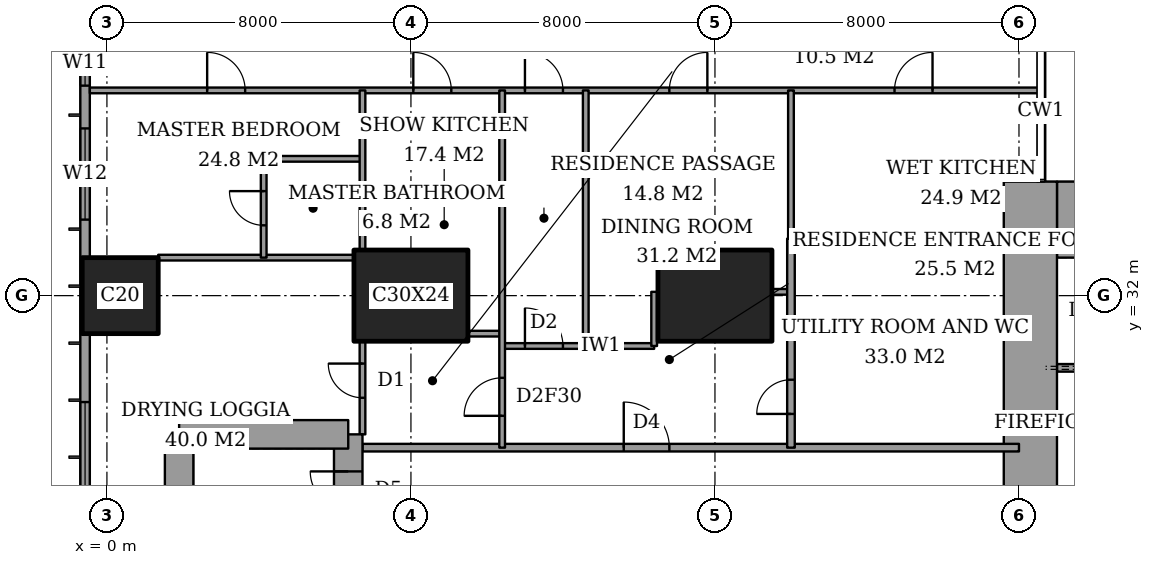
"""IFC4 building model, lengths in metres.
Left out: names, types, materials, properties, quantities, classifications, styles, units other than length and angle.
Written with IfcOpenShell. Run it as: python <this file> out.ifc"""

import sys

from ifc_helpers import new_model, si_unit, direction, frame, frame_2d, origin, origin_2d, place, context, subcontext, project, spatial, rectangle, extrude, element, fill, save


model = new_model("IFC4")
c1 = context("Model", 3, precision=1e-05, world=origin(), true_north=direction((0.0, 1.0)))
c2 = subcontext(c1, "Body", "Model", "MODEL_VIEW")
j1 = project(units=[si_unit("LENGTHUNIT", "METRE"), si_unit("PLANEANGLEUNIT", "RADIAN")], contexts=[c1])
p1 = place(None, origin())
s1 = spatial("IfcSite", under=j1, at=p1, CompositionType="ELEMENT")
p2 = place(p1, origin())
s2 = spatial("IfcBuilding", under=s1, at=p2, CompositionType="ELEMENT")
p3 = place(p2, frame((0.0, 0.0, 168.2)))
s3 = spatial("IfcBuildingStorey", under=s2, at=p3, CompositionType="ELEMENT", Elevation=168.2)
p4 = place(p3, frame((0.35, 32.0, 0.0), z_axis=(0.0, 0.0, 1.0), x_axis=(1.0, 0.0, 0.0)))
e1 = element("IfcColumn", 1, at=p4, inside=s3, PredefinedType="COLUMN", context=c2, shape_type="SweptSolid", body=[
    extrude(rectangle(XDim=2.0, YDim=2.0, at=origin_2d()), origin(), (0.0, 0.0, 1.0), 3.6),
])
for number, where, z_axis, x_axis in (
    (2, (8.0, 32.0, 0.0), (0.0, 0.0, 1.0), (1.0, 0.0, 0.0)),
    (3, (16.0, 32.0, 0.0), (0.0, 0.0, 1.0), (1.0, 0.0, 0.0)),
):
    element("IfcColumn", number, at=place(p3, frame(where, z_axis=z_axis, x_axis=x_axis)), inside=s3, PredefinedType="COLUMN", context=c2, shape_type="SweptSolid", body=[
        extrude(rectangle(XDim=3.0, YDim=2.4, at=origin_2d()), origin(), (0.0, 0.0, 1.0), 3.6),
    ])
p5 = place(p3, frame((25.0, 34.0, 0.0), z_axis=(0.0, 0.0, 1.0), x_axis=(1.0, 0.0, 0.0)))
e4 = element("IfcWall", 4, at=p5, inside=s3, PredefinedType="SHEAR", context=c2, shape_type="SweptSolid", body=[
    extrude(rectangle(XDim=3.15, YDim=2.0, at=frame_2d((1.575, 0.0))), origin(), (0.0, 0.0, 1.0), 3.6),
])
p6 = place(p3, frame((24.3, 23.15, 0.0), z_axis=(0.0, 0.0, 1.0), x_axis=(0.0, 1.0, 0.0)))
e5 = element("IfcWall", 5, at=p6, inside=s3, PredefinedType="SHEAR", context=c2, shape_type="SweptSolid", body=[
    extrude(rectangle(XDim=11.85, YDim=1.4, at=frame_2d((5.925, 0.0))), origin(), (0.0, 0.0, 1.0), 3.6),
])
p7 = place(p6, frame((0.75, 0.0, 0.0)))
e6 = element("IfcOpeningElement", 6, at=p7, cuts=e5, PredefinedType="OPENING", context=c2, shape_type="SweptSolid", body=[
    extrude(rectangle(XDim=1.8, YDim=2.4, at=frame_2d((0.9, 1.2))), frame((0.0, 0.71, 0.0), z_axis=(0.0, -1.0, 0.0), x_axis=(1.0, 0.0, 0.0)), (0.0, 0.0, 1.0), 1.42),
])
p8 = place(p3, frame((6.35, 19.65, 0.0), z_axis=(0.0, 0.0, 1.0), x_axis=(0.0, 1.0, 0.0)))
e7 = element("IfcWall", 7, at=p8, inside=s3, PredefinedType="SHEAR", context=c2, shape_type="SweptSolid", body=[
    extrude(rectangle(XDim=8.7, YDim=0.75, at=frame_2d((4.35, 0.0))), origin(), (0.0, 0.0, 1.0), 3.6),
])
p9 = place(p8, frame((6.725, 0.0, 0.0)))
e8 = element("IfcOpeningElement", 8, at=p9, cuts=e7, PredefinedType="OPENING", context=c2, shape_type="SweptSolid", body=[
    extrude(rectangle(XDim=1.0, YDim=2.1, at=frame_2d((0.5, 1.05))), frame((0.0, 0.385, 0.0), z_axis=(0.0, -1.0, 0.0), x_axis=(1.0, 0.0, 0.0)), (0.0, 0.0, 1.0), 0.77),
])
p10 = place(p3, frame((6.35, 28.35, 0.0), z_axis=(0.0, 0.0, 1.0), x_axis=(-1.0, 0.0, 0.0)))
e9 = element("IfcWall", 9, at=p10, inside=s3, PredefinedType="SHEAR", context=c2, shape_type="SweptSolid", body=[
    extrude(rectangle(XDim=4.45, YDim=0.75, at=frame_2d((2.225, 0.0))), origin(), (0.0, 0.0, 1.0), 3.6),
])
p11 = place(p3, frame((1.9, 28.35, 0.0), z_axis=(0.0, 0.0, 1.0), x_axis=(0.0, -1.0, 0.0)))
e10 = element("IfcWall", 10, at=p11, inside=s3, PredefinedType="SHEAR", context=c2, shape_type="SweptSolid", body=[
    extrude(rectangle(XDim=8.7, YDim=0.75, at=frame_2d((4.35, 0.0))), origin(), (0.0, 0.0, 1.0), 3.6),
])
p12 = place(p3, frame((-0.575, 44.825, 0.0), z_axis=(0.0, 0.0, 1.0), x_axis=(0.0, -1.0, 0.0)))
e11 = element("IfcWall", 11, at=p12, inside=s3, PredefinedType="SOLIDWALL", context=c2, shape_type="SweptSolid", body=[
    extrude(rectangle(XDim=41.65, YDim=0.25, at=frame_2d((20.825, 0.0))), origin(), (0.0, 0.0, 1.0), 3.6),
])
p13 = place(p12, frame((0.775, 0.0, 0.4)))
e12 = element("IfcOpeningElement", 12, at=p13, cuts=e11, PredefinedType="OPENING", context=c2, shape_type="SweptSolid", body=[
    extrude(rectangle(XDim=2.4, YDim=2.2, at=frame_2d((1.2, 1.1))), frame((0.0, 0.135, 0.0), z_axis=(0.0, -1.0, 0.0), x_axis=(1.0, 0.0, 0.0)), (0.0, 0.0, 1.0), 0.27),
])
p14 = place(p12, frame((6.1, 0.0, 0.4)))
e13 = element("IfcOpeningElement", 13, at=p14, cuts=e11, PredefinedType="OPENING", context=c2, shape_type="SweptSolid", body=[
    extrude(rectangle(XDim=1.2, YDim=2.2, at=frame_2d((0.6, 1.1))), frame((0.0, 0.135, 0.0), z_axis=(0.0, -1.0, 0.0), x_axis=(1.0, 0.0, 0.0)), (0.0, 0.0, 1.0), 0.27),
])
p15 = place(p12, frame((8.425, 0.0, 0.4)))
e14 = element("IfcOpeningElement", 14, at=p15, cuts=e11, PredefinedType="OPENING", context=c2, shape_type="SweptSolid", body=[
    extrude(rectangle(XDim=2.4, YDim=2.2, at=frame_2d((1.2, 1.1))), frame((0.0, 0.135, 0.0), z_axis=(0.0, -1.0, 0.0), x_axis=(1.0, 0.0, 0.0)), (0.0, 0.0, 1.0), 0.27),
])
p16 = place(p12, frame((15.625, 0.0, 0.4)))
e15 = element("IfcOpeningElement", 15, at=p16, cuts=e11, PredefinedType="OPENING", context=c2, shape_type="SweptSolid", body=[
    extrude(rectangle(XDim=2.4, YDim=2.2, at=frame_2d((1.2, 1.1))), frame((0.0, 0.135, 0.0), z_axis=(0.0, -1.0, 0.0), x_axis=(1.0, 0.0, 0.0)), (0.0, 0.0, 1.0), 0.27),
])
p17 = place(p12, frame((23.625, 0.0, 0.4)))
e16 = element("IfcOpeningElement", 16, at=p17, cuts=e11, PredefinedType="OPENING", context=c2, shape_type="SweptSolid", body=[
    extrude(rectangle(XDim=2.4, YDim=2.2, at=frame_2d((1.2, 1.1))), frame((0.0, 0.135, 0.0), z_axis=(0.0, -1.0, 0.0), x_axis=(1.0, 0.0, 0.0)), (0.0, 0.0, 1.0), 0.27),
])
p18 = place(p12, frame((30.825, 0.0, 0.4)))
e17 = element("IfcOpeningElement", 17, at=p18, cuts=e11, PredefinedType="OPENING", context=c2, shape_type="SweptSolid", body=[
    extrude(rectangle(XDim=2.4, YDim=2.2, at=frame_2d((1.2, 1.1))), frame((0.0, 0.135, 0.0), z_axis=(0.0, -1.0, 0.0), x_axis=(1.0, 0.0, 0.0)), (0.0, 0.0, 1.0), 0.27),
])
p19 = place(p12, frame((34.5, 0.0, 0.4)))
e18 = element("IfcOpeningElement", 18, at=p19, cuts=e11, PredefinedType="OPENING", context=c2, shape_type="SweptSolid", body=[
    extrude(rectangle(XDim=1.2, YDim=2.2, at=frame_2d((0.6, 1.1))), frame((0.0, 0.135, 0.0), z_axis=(0.0, -1.0, 0.0), x_axis=(1.0, 0.0, 0.0)), (0.0, 0.0, 1.0), 0.27),
])
p20 = place(p12, frame((38.475, 0.0, 0.4)))
e19 = element("IfcOpeningElement", 19, at=p20, cuts=e11, PredefinedType="OPENING", context=c2, shape_type="SweptSolid", body=[
    extrude(rectangle(XDim=2.4, YDim=2.2, at=frame_2d((1.2, 1.1))), frame((0.0, 0.135, 0.0), z_axis=(0.0, -1.0, 0.0), x_axis=(1.0, 0.0, 0.0)), (0.0, 0.0, 1.0), 0.27),
])
p21 = place(p3, frame((6.725, 28.0, 0.0), z_axis=(0.0, 0.0, 1.0), x_axis=(1.0, 0.0, 0.0)))
e20 = element("IfcWall", 20, at=p21, inside=s3, PredefinedType="PARTITIONING", context=c2, shape_type="SweptSolid", body=[
    extrude(rectangle(XDim=17.275, YDim=0.2, at=frame_2d((8.637, 0.0))), origin(), (0.0, 0.0, 1.0), 3.25),
])
p22 = place(p21, frame((6.875, 0.0, 0.0)))
e21 = element("IfcOpeningElement", 21, at=p22, cuts=e20, PredefinedType="OPENING", context=c2, shape_type="SweptSolid", body=[
    extrude(rectangle(XDim=1.2, YDim=2.4, at=frame_2d((0.6, 1.2))), frame((0.0, 0.11, 0.0), z_axis=(0.0, -1.0, 0.0), x_axis=(1.0, 0.0, 0.0)), (0.0, 0.0, 1.0), 0.22),
])
p23 = place(p3, frame((10.4, 30.675, 0.0), z_axis=(0.0, 0.0, 1.0), x_axis=(1.0, 0.0, 0.0)))
e22 = element("IfcWall", 22, at=p23, inside=s3, PredefinedType="PARTITIONING", context=c2, shape_type="SweptSolid", body=[
    extrude(rectangle(XDim=4.0, YDim=0.15, at=frame_2d((2.0, 0.0))), origin(), (0.0, 0.0, 1.0), 3.25),
])
p24 = place(p23, frame((0.6, 0.0, 0.0)))
e23 = element("IfcOpeningElement", 23, at=p24, cuts=e22, PredefinedType="OPENING", context=c2, shape_type="SweptSolid", body=[
    extrude(rectangle(XDim=1.0, YDim=2.1, at=frame_2d((0.5, 1.05))), frame((0.0, 0.085, 0.0), z_axis=(0.0, -1.0, 0.0), x_axis=(1.0, 0.0, 0.0)), (0.0, 0.0, 1.0), 0.17),
])
p25 = place(p3, frame((9.5, 31.0, 0.0), z_axis=(0.0, 0.0, 1.0), x_axis=(1.0, 0.0, 0.0)))
e24 = element("IfcWall", 24, at=p25, inside=s3, PredefinedType="PARTITIONING", context=c2, shape_type="SweptSolid", body=[
    extrude(rectangle(XDim=0.9, YDim=0.15, at=frame_2d((0.45, 0.0))), origin(), (0.0, 0.0, 1.0), 3.25),
])
p26 = place(p3, frame((17.5, 32.1, 0.0), z_axis=(0.0, 0.0, 1.0), x_axis=(1.0, 0.0, 0.0)))
e25 = element("IfcWall", 25, at=p26, inside=s3, PredefinedType="PARTITIONING", context=c2, shape_type="SweptSolid", body=[
    extrude(rectangle(XDim=0.5, YDim=0.15, at=frame_2d((0.25, 0.0))), origin(), (0.0, 0.0, 1.0), 3.25),
])
p27 = place(p3, frame((1.35, 33.0, 0.0), z_axis=(0.0, 0.0, 1.0), x_axis=(1.0, 0.0, 0.0)))
e26 = element("IfcWall", 26, at=p27, inside=s3, PredefinedType="PARTITIONING", context=c2, shape_type="SweptSolid", body=[
    extrude(rectangle(XDim=5.15, YDim=0.15, at=frame_2d((2.575, 0.0))), origin(), (0.0, 0.0, 1.0), 3.25),
])
p28 = place(p3, frame((18.0, 33.5, 0.0), z_axis=(0.0, 0.0, 1.0), x_axis=(1.0, 0.0, 0.0)))
e27 = element("IfcWall", 27, at=p28, inside=s3, PredefinedType="PARTITIONING", context=c2, shape_type="SweptSolid", body=[
    extrude(rectangle(XDim=6.0, YDim=0.2, at=frame_2d((3.0, 0.0))), origin(), (0.0, 0.0, 1.0), 3.25),
])
p29 = place(p3, frame((4.125, 35.6, 0.0), z_axis=(0.0, 0.0, 1.0), x_axis=(1.0, 0.0, 0.0)))
e28 = element("IfcWall", 28, at=p29, inside=s3, PredefinedType="PARTITIONING", context=c2, shape_type="SweptSolid", body=[
    extrude(rectangle(XDim=2.6, YDim=0.15, at=frame_2d((1.3, 0.0))), origin(), (0.0, 0.0, 1.0), 3.25),
])
p30 = place(p3, frame((-0.45, 37.4, 0.0), z_axis=(0.0, 0.0, 1.0), x_axis=(1.0, 0.0, 0.0)))
e29 = element("IfcWall", 29, at=p30, inside=s3, PredefinedType="PARTITIONING", context=c2, shape_type="SweptSolid", body=[
    extrude(rectangle(XDim=25.011, YDim=0.15, at=frame_2d((12.505, 0.0))), origin(), (0.0, 0.0, 1.0), 3.25),
])
p31 = place(p30, frame((11.45, 0.0, 0.0)))
e30 = element("IfcOpeningElement", 30, at=p31, cuts=e29, PredefinedType="OPENING", context=c2, shape_type="SweptSolid", body=[
    extrude(rectangle(XDim=1.0, YDim=2.1, at=frame_2d((0.5, 1.05))), frame((0.0, 0.085, 0.0), z_axis=(0.0, -1.0, 0.0), x_axis=(1.0, 0.0, 0.0)), (0.0, 0.0, 1.0), 0.17),
])
p32 = place(p30, frame((3.087, 0.0, 0.0)))
e31 = element("IfcOpeningElement", 31, at=p32, cuts=e29, PredefinedType="OPENING", context=c2, shape_type="SweptSolid", body=[
    extrude(rectangle(XDim=1.0, YDim=2.1, at=frame_2d((0.5, 1.05))), frame((0.0, 0.085, 0.0), z_axis=(0.0, -1.0, 0.0), x_axis=(1.0, 0.0, 0.0)), (0.0, 0.0, 1.0), 0.17),
])
p33 = place(p30, frame((8.512, 0.0, 0.0)))
e32 = element("IfcOpeningElement", 32, at=p33, cuts=e29, PredefinedType="OPENING", context=c2, shape_type="SweptSolid", body=[
    extrude(rectangle(XDim=1.0, YDim=2.1, at=frame_2d((0.5, 1.05))), frame((0.0, 0.085, 0.0), z_axis=(0.0, -1.0, 0.0), x_axis=(1.0, 0.0, 0.0)), (0.0, 0.0, 1.0), 0.17),
])
p34 = place(p30, frame((15.25, 0.0, 0.0)))
e33 = element("IfcOpeningElement", 33, at=p34, cuts=e29, PredefinedType="OPENING", context=c2, shape_type="SweptSolid", body=[
    extrude(rectangle(XDim=1.0, YDim=2.1, at=frame_2d((0.5, 1.05))), frame((0.0, 0.085, 0.0), z_axis=(0.0, -1.0, 0.0), x_axis=(1.0, 0.0, 0.0)), (0.0, 0.0, 1.0), 0.17),
])
p35 = place(p30, frame((21.175, 0.0, 0.0)))
e34 = element("IfcOpeningElement", 34, at=p35, cuts=e29, PredefinedType="OPENING", context=c2, shape_type="SweptSolid", body=[
    extrude(rectangle(XDim=1.0, YDim=2.1, at=frame_2d((0.5, 1.05))), frame((0.0, 0.085, 0.0), z_axis=(0.0, -1.0, 0.0), x_axis=(1.0, 0.0, 0.0)), (0.0, 0.0, 1.0), 0.17),
])
p36 = place(p3, frame((4.125, 33.0, 0.0), z_axis=(0.0, 0.0, 1.0), x_axis=(0.0, 1.0, 0.0)))
e35 = element("IfcWall", 35, at=p36, inside=s3, PredefinedType="PARTITIONING", context=c2, shape_type="SweptSolid", body=[
    extrude(rectangle(XDim=2.6, YDim=0.15, at=frame_2d((1.3, 0.0))), origin(), (0.0, 0.0, 1.0), 3.25),
])
p37 = place(p36, frame((0.85, 0.0, 0.0)))
e36 = element("IfcOpeningElement", 36, at=p37, cuts=e35, PredefinedType="OPENING", context=c2, shape_type="SweptSolid", body=[
    extrude(rectangle(XDim=0.9, YDim=2.1, at=frame_2d((0.45, 1.05))), frame((0.0, 0.085, 0.0), z_axis=(0.0, -1.0, 0.0), x_axis=(1.0, 0.0, 0.0)), (0.0, 0.0, 1.0), 0.17),
])
p38 = place(p3, frame((6.725, 28.35, 0.0), z_axis=(0.0, 0.0, 1.0), x_axis=(0.0, 1.0, 0.0)))
e37 = element("IfcWall", 37, at=p38, inside=s3, PredefinedType="PARTITIONING", context=c2, shape_type="SweptSolid", body=[
    extrude(rectangle(XDim=2.45, YDim=0.15, at=frame_2d((1.225, 0.0))), origin(), (0.0, 0.0, 1.0), 3.25),
])
p39 = place(p38, frame((0.962, 0.0, 0.0)))
e38 = element("IfcOpeningElement", 38, at=p39, cuts=e37, PredefinedType="OPENING", context=c2, shape_type="SweptSolid", body=[
    extrude(rectangle(XDim=0.9, YDim=2.1, at=frame_2d((0.45, 1.05))), frame((0.0, 0.085, 0.0), z_axis=(0.0, -1.0, 0.0), x_axis=(1.0, 0.0, 0.0)), (0.0, 0.0, 1.0), 0.17),
])
p40 = place(p3, frame((6.725, 33.2, 0.0), z_axis=(0.0, 0.0, 1.0), x_axis=(0.0, 1.0, 0.0)))
e39 = element("IfcWall", 39, at=p40, inside=s3, PredefinedType="PARTITIONING", context=c2, shape_type="SweptSolid", body=[
    extrude(rectangle(XDim=4.2, YDim=0.15, at=frame_2d((2.1, 0.0))), origin(), (0.0, 0.0, 1.0), 3.25),
])
p41 = place(p3, frame((10.4, 28.0, 0.0), z_axis=(0.0, 0.0, 1.0), x_axis=(0.0, 1.0, 0.0)))
e40 = element("IfcWall", 40, at=p41, inside=s3, PredefinedType="PARTITIONING", context=c2, shape_type="SweptSolid", body=[
    extrude(rectangle(XDim=9.4, YDim=0.15, at=frame_2d((4.7, 0.0))), origin(), (0.0, 0.0, 1.0), 3.25),
])
p42 = place(p41, frame((0.837, 0.0, 0.0)))
e41 = element("IfcOpeningElement", 41, at=p42, cuts=e40, PredefinedType="OPENING", context=c2, shape_type="SweptSolid", body=[
    extrude(rectangle(XDim=1.0, YDim=2.1, at=frame_2d((0.5, 1.05))), frame((0.0, 0.085, 0.0), z_axis=(0.0, -1.0, 0.0), x_axis=(1.0, 0.0, 0.0)), (0.0, 0.0, 1.0), 0.17),
])
p43 = place(p3, frame((12.6, 30.675, 0.0), z_axis=(0.0, 0.0, 1.0), x_axis=(0.0, 1.0, 0.0)))
e42 = element("IfcWall", 42, at=p43, inside=s3, PredefinedType="PARTITIONING", context=c2, shape_type="SweptSolid", body=[
    extrude(rectangle(XDim=6.725, YDim=0.15, at=frame_2d((3.362, 0.0))), origin(), (0.0, 0.0, 1.0), 3.25),
])
p44 = place(p3, frame((14.4, 30.675, 0.0), z_axis=(0.0, 0.0, 1.0), x_axis=(0.0, 1.0, 0.0)))
e43 = element("IfcWall", 43, at=p44, inside=s3, PredefinedType="PARTITIONING", context=c2, shape_type="SweptSolid", body=[
    extrude(rectangle(XDim=1.425, YDim=0.15, at=frame_2d((0.712, 0.0))), origin(), (0.0, 0.0, 1.0), 3.25),
])
p45 = place(p3, frame((18.0, 28.0, 0.0), z_axis=(0.0, 0.0, 1.0), x_axis=(0.0, 1.0, 0.0)))
e44 = element("IfcWall", 44, at=p45, inside=s3, PredefinedType="PARTITIONING", context=c2, shape_type="SweptSolid", body=[
    extrude(rectangle(XDim=5.5, YDim=0.2, at=frame_2d((2.75, 0.0))), origin(), (0.0, 0.0, 1.0), 3.25),
])
p46 = place(p45, frame((0.887, 0.0, 0.0)))
e45 = element("IfcOpeningElement", 45, at=p46, cuts=e44, PredefinedType="OPENING", context=c2, shape_type="SweptSolid", body=[
    extrude(rectangle(XDim=0.9, YDim=2.1, at=frame_2d((0.45, 1.05))), frame((0.0, 0.11, 0.0), z_axis=(0.0, -1.0, 0.0), x_axis=(1.0, 0.0, 0.0)), (0.0, 0.0, 1.0), 0.22),
])
p47 = place(p3, frame((18.0, 33.5, 0.0), z_axis=(0.0, 0.0, 1.0), x_axis=(0.0, 1.0, 0.0)))
e46 = element("IfcWall", 46, at=p47, inside=s3, PredefinedType="PARTITIONING", context=c2, shape_type="SweptSolid", body=[
    extrude(rectangle(XDim=3.9, YDim=0.15, at=frame_2d((1.95, 0.0))), origin(), (0.0, 0.0, 1.0), 3.25),
])
p48 = place(p3, frame((25.0, 30.1, 0.0), z_axis=(0.0, 0.0, 1.0), x_axis=(1.0, 0.0, 0.0)))
e47 = element("IfcWall", 47, at=p48, inside=s3, PredefinedType="PARTITIONING", context=c2, shape_type="SweptSolid", body=[
    extrude(rectangle(XDim=12.7, YDim=0.2, at=frame_2d((6.35, 0.0))), origin(), (0.0, 0.0, 1.0), 3.6),
])
p49 = place(p48, frame((0.9, 0.0, 0.0)))
e48 = element("IfcOpeningElement", 48, at=p49, cuts=e47, PredefinedType="OPENING", context=c2, shape_type="SweptSolid", body=[
    extrude(rectangle(XDim=1.2, YDim=2.1, at=frame_2d((0.6, 1.05))), frame((0.0, 0.11, 0.0), z_axis=(0.0, -1.0, 0.0), x_axis=(1.0, 0.0, 0.0)), (0.0, 0.0, 1.0), 0.22),
])
p50 = place(p14, origin())
e49 = element("IfcWindow", 49, at=p50, inside=s3, PartitioningType="SINGLE_PANEL", PredefinedType="WINDOW", context=c2, shape_type="SweptSolid", body=[
    extrude(rectangle(XDim=1.2, YDim=2.2, at=frame_2d((0.6, 1.1))), frame((0.0, 0.03, 0.0), z_axis=(0.0, -1.0, 0.0), x_axis=(1.0, 0.0, 0.0)), (0.0, 0.0, 1.0), 0.06),
])
fill(e13, e49)
p51 = place(p15, origin())
e50 = element("IfcWindow", 50, at=p51, inside=s3, PartitioningType="SINGLE_PANEL", PredefinedType="WINDOW", context=c2, shape_type="SweptSolid", body=[
    extrude(rectangle(XDim=2.4, YDim=2.2, at=frame_2d((1.2, 1.1))), frame((0.0, 0.03, 0.0), z_axis=(0.0, -1.0, 0.0), x_axis=(1.0, 0.0, 0.0)), (0.0, 0.0, 1.0), 0.06),
])
fill(e14, e50)
p52 = place(p16, origin())
e51 = element("IfcWindow", 51, at=p52, inside=s3, PartitioningType="SINGLE_PANEL", PredefinedType="WINDOW", context=c2, shape_type="SweptSolid", body=[
    extrude(rectangle(XDim=2.4, YDim=2.2, at=frame_2d((1.2, 1.1))), frame((0.0, 0.03, 0.0), z_axis=(0.0, -1.0, 0.0), x_axis=(1.0, 0.0, 0.0)), (0.0, 0.0, 1.0), 0.06),
])
fill(e15, e51)
p53 = place(p31, origin())
e52 = element("IfcDoor", 52, at=p53, inside=s3, OperationType="SINGLE_SWING_RIGHT", PredefinedType="DOOR", context=c2, shape_type="SweptSolid", body=[
    extrude(rectangle(XDim=1.0, YDim=2.1, at=frame_2d((0.5, 1.05))), frame((0.0, 0.025, 0.0), z_axis=(0.0, -1.0, 0.0), x_axis=(1.0, 0.0, 0.0)), (0.0, 0.0, 1.0), 0.05),
])
fill(e30, e52)
p54 = place(p37, origin())
e53 = element("IfcDoor", 53, at=p54, inside=s3, OperationType="SINGLE_SWING_LEFT", PredefinedType="DOOR", context=c2, shape_type="SweptSolid", body=[
    extrude(rectangle(XDim=0.9, YDim=2.1, at=frame_2d((0.45, 1.05))), frame((0.0, 0.025, 0.0), z_axis=(0.0, -1.0, 0.0), x_axis=(1.0, 0.0, 0.0)), (0.0, 0.0, 1.0), 0.05),
])
fill(e36, e53)
p55 = place(p32, origin())
e54 = element("IfcDoor", 54, at=p55, inside=s3, OperationType="SINGLE_SWING_RIGHT", PredefinedType="DOOR", context=c2, shape_type="SweptSolid", body=[
    extrude(rectangle(XDim=1.0, YDim=2.1, at=frame_2d((0.5, 1.05))), frame((0.0, 0.025, 0.0), z_axis=(0.0, -1.0, 0.0), x_axis=(1.0, 0.0, 0.0)), (0.0, 0.0, 1.0), 0.05),
])
fill(e31, e54)
p56 = place(p39, origin())
e55 = element("IfcDoor", 55, at=p56, inside=s3, OperationType="SINGLE_SWING_LEFT", PredefinedType="DOOR", context=c2, shape_type="SweptSolid", body=[
    extrude(rectangle(XDim=0.9, YDim=2.1, at=frame_2d((0.45, 1.05))), frame((0.0, 0.025, 0.0), z_axis=(0.0, -1.0, 0.0), x_axis=(1.0, 0.0, 0.0)), (0.0, 0.0, 1.0), 0.05),
])
fill(e38, e55)
p57 = place(p33, origin())
e56 = element("IfcDoor", 56, at=p57, inside=s3, OperationType="SINGLE_SWING_RIGHT", PredefinedType="DOOR", context=c2, shape_type="SweptSolid", body=[
    extrude(rectangle(XDim=1.0, YDim=2.1, at=frame_2d((0.5, 1.05))), frame((0.0, 0.025, 0.0), z_axis=(0.0, -1.0, 0.0), x_axis=(1.0, 0.0, 0.0)), (0.0, 0.0, 1.0), 0.05),
])
fill(e32, e56)
p58 = place(p42, origin())
e57 = element("IfcDoor", 57, at=p58, inside=s3, OperationType="SINGLE_SWING_RIGHT", PredefinedType="DOOR", context=c2, shape_type="SweptSolid", body=[
    extrude(rectangle(XDim=1.0, YDim=2.1, at=frame_2d((0.5, 1.05))), frame((0.0, 0.025, 0.0), z_axis=(0.0, -1.0, 0.0), x_axis=(1.0, 0.0, 0.0)), (0.0, 0.0, 1.0), 0.05),
])
fill(e41, e57)
p59 = place(p22, origin())
e58 = element("IfcDoor", 58, at=p59, inside=s3, OperationType="SINGLE_SWING_RIGHT", PredefinedType="DOOR", context=c2, shape_type="SweptSolid", body=[
    extrude(rectangle(XDim=1.2, YDim=2.4, at=frame_2d((0.6, 1.2))), frame((0.0, 0.025, 0.0), z_axis=(0.0, -1.0, 0.0), x_axis=(1.0, 0.0, 0.0)), (0.0, 0.0, 1.0), 0.05),
])
fill(e21, e58)
p60 = place(p24, origin())
e59 = element("IfcDoor", 59, at=p60, inside=s3, OperationType="SINGLE_SWING_RIGHT", PredefinedType="DOOR", context=c2, shape_type="SweptSolid", body=[
    extrude(rectangle(XDim=1.0, YDim=2.1, at=frame_2d((0.5, 1.05))), frame((0.0, 0.025, 0.0), z_axis=(0.0, -1.0, 0.0), x_axis=(1.0, 0.0, 0.0)), (0.0, 0.0, 1.0), 0.05),
])
fill(e23, e59)
p61 = place(p34, origin())
e60 = element("IfcDoor", 60, at=p61, inside=s3, OperationType="SINGLE_SWING_LEFT", PredefinedType="DOOR", context=c2, shape_type="SweptSolid", body=[
    extrude(rectangle(XDim=1.0, YDim=2.1, at=frame_2d((0.5, 1.05))), frame((0.0, 0.025, 0.0), z_axis=(0.0, -1.0, 0.0), x_axis=(1.0, 0.0, 0.0)), (0.0, 0.0, 1.0), 0.05),
])
fill(e33, e60)
p62 = place(p35, origin())
e61 = element("IfcDoor", 61, at=p62, inside=s3, OperationType="SINGLE_SWING_LEFT", PredefinedType="DOOR", context=c2, shape_type="SweptSolid", body=[
    extrude(rectangle(XDim=1.0, YDim=2.1, at=frame_2d((0.5, 1.05))), frame((0.0, 0.025, 0.0), z_axis=(0.0, -1.0, 0.0), x_axis=(1.0, 0.0, 0.0)), (0.0, 0.0, 1.0), 0.05),
])
fill(e34, e61)
p63 = place(p46, origin())
e62 = element("IfcDoor", 62, at=p63, inside=s3, OperationType="SINGLE_SWING_RIGHT", PredefinedType="DOOR", context=c2, shape_type="SweptSolid", body=[
    extrude(rectangle(XDim=0.9, YDim=2.1, at=frame_2d((0.45, 1.05))), frame((0.0, 0.025, 0.0), z_axis=(0.0, -1.0, 0.0), x_axis=(1.0, 0.0, 0.0)), (0.0, 0.0, 1.0), 0.05),
])
fill(e45, e62)
p64 = place(p9, origin())
e63 = element("IfcDoor", 63, at=p64, inside=s3, OperationType="SINGLE_SWING_LEFT", PredefinedType="DOOR", context=c2, shape_type="SweptSolid", body=[
    extrude(rectangle(XDim=1.0, YDim=2.1, at=frame_2d((0.5, 1.05))), frame((0.0, 0.025, 0.0), z_axis=(0.0, -1.0, 0.0), x_axis=(1.0, 0.0, 0.0)), (0.0, 0.0, 1.0), 0.05),
])
fill(e8, e63)
save(model, sys.argv[1])
